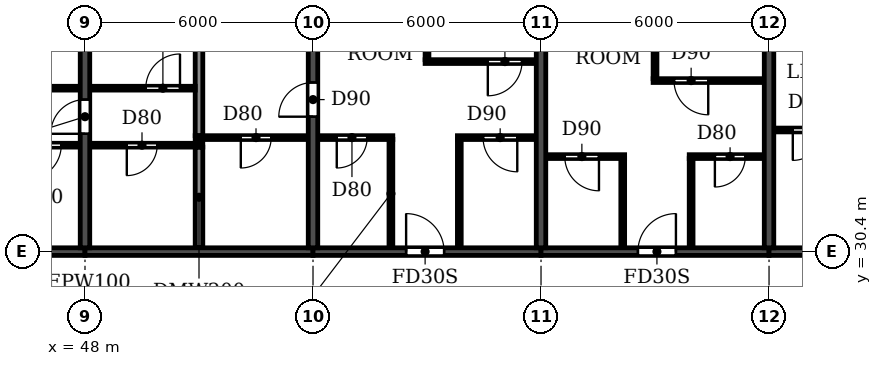
"""IFC4 building model, lengths in metres.
Left out: names, types, materials, properties, quantities, classifications, styles, units other than length and angle.
Written with IfcOpenShell. Run it as: python <this file> out.ifc"""

import sys

from ifc_helpers import new_model, si_unit, direction, frame, frame_2d, origin, place, context, subcontext, project, spatial, rectangle, extrude, element, fill, save


model = new_model("IFC4")
c1 = context("Model", 3, precision=1e-05, world=origin(), true_north=direction((0.0, 1.0)))
c2 = subcontext(c1, "Body", "Model", "MODEL_VIEW")
j1 = project(units=[si_unit("LENGTHUNIT", "METRE"), si_unit("PLANEANGLEUNIT", "RADIAN")], contexts=[c1])
p1 = place(None, origin())
s1 = spatial("IfcSite", under=j1, at=p1, CompositionType="ELEMENT")
p2 = place(p1, origin())
s2 = spatial("IfcBuilding", under=s1, at=p2, CompositionType="ELEMENT")
p3 = place(p2, frame((0.0, 0.0, 181.8)))
s3 = spatial("IfcBuildingStorey", under=s2, at=p3, CompositionType="ELEMENT", Elevation=181.8)
p4 = place(p3, frame((48.0, 30.5, 0.0), z_axis=(0.0, 0.0, 1.0), x_axis=(0.0, 1.0, 0.0)))
e1 = element("IfcWall", 1, at=p4, inside=s3, PredefinedType="SHEAR", context=c2, shape_type="SweptSolid", body=[
    extrude(rectangle(XDim=10.5, YDim=0.25, at=frame_2d((5.25, 0.0))), origin(), (0.0, 0.0, 1.0), 3.08),
])
p5 = place(p4, frame((3.0, 0.0, 0.0)))
e2 = element("IfcOpeningElement", 2, at=p5, cuts=e1, PredefinedType="OPENING", context=c2, shape_type="SweptSolid", body=[
    extrude(rectangle(XDim=0.9, YDim=2.1, at=frame_2d((0.45, 1.05))), frame((0.0, 0.135, 0.0), z_axis=(0.0, -1.0, 0.0), x_axis=(1.0, 0.0, 0.0)), (0.0, 0.0, 1.0), 0.27),
])
p6 = place(p3, frame((54.0, 30.5, 0.0), z_axis=(0.0, 0.0, 1.0), x_axis=(0.0, 1.0, 0.0)))
e3 = element("IfcWall", 3, at=p6, inside=s3, PredefinedType="SHEAR", context=c2, shape_type="SweptSolid", body=[
    extrude(rectangle(XDim=10.5, YDim=0.25, at=frame_2d((5.25, 0.0))), origin(), (0.0, 0.0, 1.0), 3.08),
])
p7 = place(p6, frame((3.45, 0.0, 0.0)))
e4 = element("IfcOpeningElement", 4, at=p7, cuts=e3, PredefinedType="OPENING", context=c2, shape_type="SweptSolid", body=[
    extrude(rectangle(XDim=0.9, YDim=2.1, at=frame_2d((0.45, 1.05))), frame((0.0, 0.135, 0.0), z_axis=(0.0, -1.0, 0.0), x_axis=(1.0, 0.0, 0.0)), (0.0, 0.0, 1.0), 0.27),
])
for number, where, z_axis, x_axis in (
    (5, (60.0, 30.5, 0.0), (0.0, 0.0, 1.0), (0.0, 1.0, 0.0)),
    (6, (66.0, 30.5, 0.0), (0.0, 0.0, 1.0), (0.0, 1.0, 0.0)),
):
    element("IfcWall", number, at=place(p3, frame(where, z_axis=z_axis, x_axis=x_axis)), inside=s3, PredefinedType="SHEAR", context=c2, shape_type="SweptSolid", body=[
        extrude(rectangle(XDim=10.5, YDim=0.25, at=frame_2d((5.25, 0.0))), origin(), (0.0, 0.0, 1.0), 3.08),
    ])
p8 = place(p3, frame((42.0, 30.4, 0.0), z_axis=(0.0, 0.0, 1.0), x_axis=(1.0, 0.0, 0.0)))
e7 = element("IfcWall", 7, at=p8, inside=s3, PredefinedType="SHEAR", context=c2, shape_type="SweptSolid", body=[
    extrude(rectangle(XDim=6.0, YDim=0.2, at=frame_2d((3.0, 0.0))), origin(), (0.0, 0.0, 1.0), 2.48),
])
p9 = place(p8, frame((2.45, 0.0, 0.0)))
e8 = element("IfcOpeningElement", 8, at=p9, cuts=e7, PredefinedType="OPENING", context=c2, shape_type="SweptSolid", body=[
    extrude(rectangle(XDim=1.0, YDim=2.1, at=frame_2d((0.5, 1.05))), frame((0.0, 0.11, 0.0), z_axis=(0.0, -1.0, 0.0), x_axis=(1.0, 0.0, 0.0)), (0.0, 0.0, 1.0), 0.22),
])
p10 = place(p3, frame((48.0, 30.4, 0.0), z_axis=(0.0, 0.0, 1.0), x_axis=(1.0, 0.0, 0.0)))
e9 = element("IfcWall", 9, at=p10, inside=s3, PredefinedType="SHEAR", context=c2, shape_type="SweptSolid", body=[
    extrude(rectangle(XDim=6.0, YDim=0.2, at=frame_2d((3.0, 0.0))), origin(), (0.0, 0.0, 1.0), 2.48),
])
p11 = place(p3, frame((54.0, 30.4, 0.0), z_axis=(0.0, 0.0, 1.0), x_axis=(1.0, 0.0, 0.0)))
e10 = element("IfcWall", 10, at=p11, inside=s3, PredefinedType="SHEAR", context=c2, shape_type="SweptSolid", body=[
    extrude(rectangle(XDim=6.0, YDim=0.2, at=frame_2d((3.0, 0.0))), origin(), (0.0, 0.0, 1.0), 2.48),
])
p12 = place(p11, frame((2.45, 0.0, 0.0)))
e11 = element("IfcOpeningElement", 11, at=p12, cuts=e10, PredefinedType="OPENING", context=c2, shape_type="SweptSolid", body=[
    extrude(rectangle(XDim=1.0, YDim=2.1, at=frame_2d((0.5, 1.05))), frame((0.0, 0.11, 0.0), z_axis=(0.0, -1.0, 0.0), x_axis=(1.0, 0.0, 0.0)), (0.0, 0.0, 1.0), 0.22),
])
p13 = place(p3, frame((60.0, 30.4, 0.0), z_axis=(0.0, 0.0, 1.0), x_axis=(1.0, 0.0, 0.0)))
e12 = element("IfcWall", 12, at=p13, inside=s3, PredefinedType="SHEAR", context=c2, shape_type="SweptSolid", body=[
    extrude(rectangle(XDim=6.0, YDim=0.2, at=frame_2d((3.0, 0.0))), origin(), (0.0, 0.0, 1.0), 2.48),
])
p14 = place(p13, frame((2.55, 0.0, 0.0)))
e13 = element("IfcOpeningElement", 13, at=p14, cuts=e12, PredefinedType="OPENING", context=c2, shape_type="SweptSolid", body=[
    extrude(rectangle(XDim=1.0, YDim=2.1, at=frame_2d((0.5, 1.05))), frame((0.0, 0.11, 0.0), z_axis=(0.0, -1.0, 0.0), x_axis=(1.0, 0.0, 0.0)), (0.0, 0.0, 1.0), 0.22),
])
p15 = place(p3, frame((66.0, 30.4, 0.0), z_axis=(0.0, 0.0, 1.0), x_axis=(1.0, 0.0, 0.0)))
e14 = element("IfcWall", 14, at=p15, inside=s3, PredefinedType="SHEAR", context=c2, shape_type="SweptSolid", body=[
    extrude(rectangle(XDim=6.0, YDim=0.2, at=frame_2d((3.0, 0.0))), origin(), (0.0, 0.0, 1.0), 2.48),
])
p16 = place(p15, frame((2.45, 0.0, 0.0)))
e15 = element("IfcOpeningElement", 15, at=p16, cuts=e14, PredefinedType="OPENING", context=c2, shape_type="SweptSolid", body=[
    extrude(rectangle(XDim=1.0, YDim=2.1, at=frame_2d((0.5, 1.05))), frame((0.0, 0.11, 0.0), z_axis=(0.0, -1.0, 0.0), x_axis=(1.0, 0.0, 0.0)), (0.0, 0.0, 1.0), 0.22),
])
p17 = place(p3, frame((51.0, 30.51, 0.0), z_axis=(0.0, 0.0, 1.0), x_axis=(0.0, 1.0, 0.0)))
e16 = element("IfcWall", 16, at=p17, inside=s3, PredefinedType="PARTITIONING", context=c2, shape_type="SweptSolid", body=[
    extrude(rectangle(XDim=2.64, YDim=0.2, at=frame_2d((1.32, 0.0))), origin(), (0.0, 0.0, 1.0), 3.08),
])
p18 = place(p3, frame((51.0, 33.45, 0.0), z_axis=(0.0, 0.0, 1.0), x_axis=(0.0, 1.0, 0.0)))
e17 = element("IfcWall", 17, at=p18, inside=s3, PredefinedType="PARTITIONING", context=c2, shape_type="SweptSolid", body=[
    extrude(rectangle(XDim=7.69, YDim=0.2, at=frame_2d((3.845, 0.0))), origin(), (0.0, 0.0, 1.0), 3.08),
])
p19 = place(p3, frame((60.135, 32.9, 0.0), z_axis=(0.0, 0.0, 1.0), x_axis=(1.0, 0.0, 0.0)))
e18 = element("IfcWall", 18, at=p19, inside=s3, PredefinedType="PARTITIONING", context=c2, shape_type="SweptSolid", body=[
    extrude(rectangle(XDim=2.065, YDim=0.1, at=frame_2d((1.032, 0.0))), origin(), (0.0, 0.0, 1.0), 3.08),
])
p20 = place(p19, frame((0.49, 0.0, 0.0)))
e19 = element("IfcOpeningElement", 19, at=p20, cuts=e18, PredefinedType="OPENING", context=c2, shape_type="SweptSolid", body=[
    extrude(rectangle(XDim=0.9, YDim=2.1, at=frame_2d((0.45, 1.05))), frame((0.0, 0.06, 0.0), z_axis=(0.0, -1.0, 0.0), x_axis=(1.0, 0.0, 0.0)), (0.0, 0.0, 1.0), 0.12),
])
p21 = place(p3, frame((63.9, 32.9, 0.0), z_axis=(0.0, 0.0, 1.0), x_axis=(1.0, 0.0, 0.0)))
e20 = element("IfcWall", 20, at=p21, inside=s3, PredefinedType="PARTITIONING", context=c2, shape_type="SweptSolid", body=[
    extrude(rectangle(XDim=1.965, YDim=0.1, at=frame_2d((0.982, 0.0))), origin(), (0.0, 0.0, 1.0), 3.08),
])
p22 = place(p21, frame((0.675, 0.0, 0.0)))
e21 = element("IfcOpeningElement", 21, at=p22, cuts=e20, PredefinedType="OPENING", context=c2, shape_type="SweptSolid", body=[
    extrude(rectangle(XDim=0.8, YDim=2.1, at=frame_2d((0.4, 1.05))), frame((0.0, 0.06, 0.0), z_axis=(0.0, -1.0, 0.0), x_axis=(1.0, 0.0, 0.0)), (0.0, 0.0, 1.0), 0.12),
])
p23 = place(p3, frame((45.8, 33.2, 0.0), z_axis=(0.0, 0.0, 1.0), x_axis=(1.0, 0.0, 0.0)))
e22 = element("IfcWall", 22, at=p23, inside=s3, PredefinedType="PARTITIONING", context=c2, shape_type="SweptSolid", body=[
    extrude(rectangle(XDim=2.065, YDim=0.1, at=frame_2d((1.032, 0.0))), origin(), (0.0, 0.0, 1.0), 3.08),
])
p24 = place(p23, frame((0.675, 0.0, 0.0)))
e23 = element("IfcOpeningElement", 23, at=p24, cuts=e22, PredefinedType="OPENING", context=c2, shape_type="SweptSolid", body=[
    extrude(rectangle(XDim=0.9, YDim=2.1, at=frame_2d((0.45, 1.05))), frame((0.0, 0.06, 0.0), z_axis=(0.0, -1.0, 0.0), x_axis=(1.0, 0.0, 0.0)), (0.0, 0.0, 1.0), 0.12),
])
p25 = place(p3, frame((48.135, 33.2, 0.0), z_axis=(0.0, 0.0, 1.0), x_axis=(1.0, 0.0, 0.0)))
e24 = element("IfcWall", 24, at=p25, inside=s3, PredefinedType="PARTITIONING", context=c2, shape_type="SweptSolid", body=[
    extrude(rectangle(XDim=2.965, YDim=0.1, at=frame_2d((1.482, 0.0))), origin(), (0.0, 0.0, 1.0), 3.08),
])
p26 = place(p25, frame((0.965, 0.0, 0.0)))
e25 = element("IfcOpeningElement", 25, at=p26, cuts=e24, PredefinedType="OPENING", context=c2, shape_type="SweptSolid", body=[
    extrude(rectangle(XDim=0.8, YDim=2.1, at=frame_2d((0.4, 1.05))), frame((0.0, 0.06, 0.0), z_axis=(0.0, -1.0, 0.0), x_axis=(1.0, 0.0, 0.0)), (0.0, 0.0, 1.0), 0.12),
])
p27 = place(p3, frame((50.9, 33.4, 0.0), z_axis=(0.0, 0.0, 1.0), x_axis=(1.0, 0.0, 0.0)))
e26 = element("IfcWall", 26, at=p27, inside=s3, PredefinedType="PARTITIONING", context=c2, shape_type="SweptSolid", body=[
    extrude(rectangle(XDim=2.965, YDim=0.1, at=frame_2d((1.482, 0.0))), origin(), (0.0, 0.0, 1.0), 3.08),
])
p28 = place(p27, frame((1.2, 0.0, 0.0)))
e27 = element("IfcOpeningElement", 27, at=p28, cuts=e26, PredefinedType="OPENING", context=c2, shape_type="SweptSolid", body=[
    extrude(rectangle(XDim=0.8, YDim=2.1, at=frame_2d((0.4, 1.05))), frame((0.0, 0.06, 0.0), z_axis=(0.0, -1.0, 0.0), x_axis=(1.0, 0.0, 0.0)), (0.0, 0.0, 1.0), 0.12),
])
p29 = place(p3, frame((54.135, 33.4, 0.0), z_axis=(0.0, 0.0, 1.0), x_axis=(1.0, 0.0, 0.0)))
e28 = element("IfcWall", 28, at=p29, inside=s3, PredefinedType="PARTITIONING", context=c2, shape_type="SweptSolid", body=[
    extrude(rectangle(XDim=1.965, YDim=0.1, at=frame_2d((0.982, 0.0))), origin(), (0.0, 0.0, 1.0), 3.08),
])
p30 = place(p29, frame((0.49, 0.0, 0.0)))
e29 = element("IfcOpeningElement", 29, at=p30, cuts=e28, PredefinedType="OPENING", context=c2, shape_type="SweptSolid", body=[
    extrude(rectangle(XDim=0.8, YDim=2.1, at=frame_2d((0.4, 1.05))), frame((0.0, 0.06, 0.0), z_axis=(0.0, -1.0, 0.0), x_axis=(1.0, 0.0, 0.0)), (0.0, 0.0, 1.0), 0.12),
])
p31 = place(p3, frame((57.8, 33.4, 0.0), z_axis=(0.0, 0.0, 1.0), x_axis=(1.0, 0.0, 0.0)))
e30 = element("IfcWall", 30, at=p31, inside=s3, PredefinedType="PARTITIONING", context=c2, shape_type="SweptSolid", body=[
    extrude(rectangle(XDim=2.065, YDim=0.1, at=frame_2d((1.032, 0.0))), origin(), (0.0, 0.0, 1.0), 3.08),
])
p32 = place(p31, frame((0.675, 0.0, 0.0)))
e31 = element("IfcOpeningElement", 31, at=p32, cuts=e30, PredefinedType="OPENING", context=c2, shape_type="SweptSolid", body=[
    extrude(rectangle(XDim=0.9, YDim=2.1, at=frame_2d((0.45, 1.05))), frame((0.0, 0.06, 0.0), z_axis=(0.0, -1.0, 0.0), x_axis=(1.0, 0.0, 0.0)), (0.0, 0.0, 1.0), 0.12),
])
p33 = place(p3, frame((66.135, 33.6, 0.0), z_axis=(0.0, 0.0, 1.0), x_axis=(1.0, 0.0, 0.0)))
e32 = element("IfcWall", 32, at=p33, inside=s3, PredefinedType="PARTITIONING", context=c2, shape_type="SweptSolid", body=[
    extrude(rectangle(XDim=1.965, YDim=0.1, at=frame_2d((0.982, 0.0))), origin(), (0.0, 0.0, 1.0), 3.08),
])
p34 = place(p33, frame((0.49, 0.0, 0.0)))
e33 = element("IfcOpeningElement", 33, at=p34, cuts=e32, PredefinedType="OPENING", context=c2, shape_type="SweptSolid", body=[
    extrude(rectangle(XDim=0.8, YDim=2.1, at=frame_2d((0.4, 1.05))), frame((0.0, 0.06, 0.0), z_axis=(0.0, -1.0, 0.0), x_axis=(1.0, 0.0, 0.0)), (0.0, 0.0, 1.0), 0.12),
])
p35 = place(p3, frame((44.95, 34.7, 0.0), z_axis=(0.0, 0.0, 1.0), x_axis=(1.0, 0.0, 0.0)))
e34 = element("IfcWall", 34, at=p35, inside=s3, PredefinedType="PARTITIONING", context=c2, shape_type="SweptSolid", body=[
    extrude(rectangle(XDim=2.915, YDim=0.1, at=frame_2d((1.458, 0.0))), origin(), (0.0, 0.0, 1.0), 3.08),
])
p36 = place(p35, frame((0.55, 0.0, 0.0)))
e35 = element("IfcOpeningElement", 35, at=p36, cuts=e34, PredefinedType="OPENING", context=c2, shape_type="SweptSolid", body=[
    extrude(rectangle(XDim=0.9, YDim=2.1, at=frame_2d((0.45, 1.05))), frame((0.0, 0.06, 0.0), z_axis=(0.0, -1.0, 0.0), x_axis=(1.0, 0.0, 0.0)), (0.0, 0.0, 1.0), 0.12),
])
p37 = place(p3, frame((48.135, 34.7, 0.0), z_axis=(0.0, 0.0, 1.0), x_axis=(1.0, 0.0, 0.0)))
e36 = element("IfcWall", 36, at=p37, inside=s3, PredefinedType="PARTITIONING", context=c2, shape_type="SweptSolid", body=[
    extrude(rectangle(XDim=2.765, YDim=0.1, at=frame_2d((1.382, 0.0))), origin(), (0.0, 0.0, 1.0), 3.08),
])
p38 = place(p37, frame((1.465, 0.0, 0.0)))
e37 = element("IfcOpeningElement", 37, at=p38, cuts=e36, PredefinedType="OPENING", context=c2, shape_type="SweptSolid", body=[
    extrude(rectangle(XDim=0.9, YDim=2.1, at=frame_2d((0.45, 1.05))), frame((0.0, 0.06, 0.0), z_axis=(0.0, -1.0, 0.0), x_axis=(1.0, 0.0, 0.0)), (0.0, 0.0, 1.0), 0.12),
])
p39 = place(p3, frame((62.95, 34.9, 0.0), z_axis=(0.0, 0.0, 1.0), x_axis=(1.0, 0.0, 0.0)))
e38 = element("IfcWall", 38, at=p39, inside=s3, PredefinedType="PARTITIONING", context=c2, shape_type="SweptSolid", body=[
    extrude(rectangle(XDim=2.915, YDim=0.1, at=frame_2d((1.458, 0.0))), origin(), (0.0, 0.0, 1.0), 3.08),
])
p40 = place(p39, frame((0.55, 0.0, 0.0)))
e39 = element("IfcOpeningElement", 39, at=p40, cuts=e38, PredefinedType="OPENING", context=c2, shape_type="SweptSolid", body=[
    extrude(rectangle(XDim=0.9, YDim=2.1, at=frame_2d((0.45, 1.05))), frame((0.0, 0.06, 0.0), z_axis=(0.0, -1.0, 0.0), x_axis=(1.0, 0.0, 0.0)), (0.0, 0.0, 1.0), 0.12),
])
p41 = place(p3, frame((56.95, 35.4, 0.0), z_axis=(0.0, 0.0, 1.0), x_axis=(1.0, 0.0, 0.0)))
e40 = element("IfcWall", 40, at=p41, inside=s3, PredefinedType="PARTITIONING", context=c2, shape_type="SweptSolid", body=[
    extrude(rectangle(XDim=2.915, YDim=0.1, at=frame_2d((1.458, 0.0))), origin(), (0.0, 0.0, 1.0), 3.08),
])
p42 = place(p41, frame((1.65, 0.0, 0.0)))
e41 = element("IfcOpeningElement", 41, at=p42, cuts=e40, PredefinedType="OPENING", context=c2, shape_type="SweptSolid", body=[
    extrude(rectangle(XDim=0.9, YDim=2.1, at=frame_2d((0.45, 1.05))), frame((0.0, 0.06, 0.0), z_axis=(0.0, -1.0, 0.0), x_axis=(1.0, 0.0, 0.0)), (0.0, 0.0, 1.0), 0.12),
])
p43 = place(p3, frame((56.05, 30.51, 0.0), z_axis=(0.0, 0.0, 1.0), x_axis=(0.0, 1.0, 0.0)))
e42 = element("IfcWall", 42, at=p43, inside=s3, PredefinedType="PARTITIONING", context=c2, shape_type="SweptSolid", body=[
    extrude(rectangle(XDim=2.84, YDim=0.1, at=frame_2d((1.42, 0.0))), origin(), (0.0, 0.0, 1.0), 3.08),
])
p44 = place(p3, frame((57.0, 35.45, 0.0), z_axis=(0.0, 0.0, 1.0), x_axis=(0.0, 1.0, 0.0)))
e43 = element("IfcWall", 43, at=p44, inside=s3, PredefinedType="PARTITIONING", context=c2, shape_type="SweptSolid", body=[
    extrude(rectangle(XDim=5.69, YDim=0.1, at=frame_2d((2.845, 0.0))), origin(), (0.0, 0.0, 1.0), 3.08),
])
p45 = place(p3, frame((57.85, 30.51, 0.0), z_axis=(0.0, 0.0, 1.0), x_axis=(0.0, 1.0, 0.0)))
e44 = element("IfcWall", 44, at=p45, inside=s3, PredefinedType="PARTITIONING", context=c2, shape_type="SweptSolid", body=[
    extrude(rectangle(XDim=2.84, YDim=0.1, at=frame_2d((1.42, 0.0))), origin(), (0.0, 0.0, 1.0), 3.08),
])
p46 = place(p3, frame((62.15, 30.51, 0.0), z_axis=(0.0, 0.0, 1.0), x_axis=(0.0, 1.0, 0.0)))
e45 = element("IfcWall", 45, at=p46, inside=s3, PredefinedType="PARTITIONING", context=c2, shape_type="SweptSolid", body=[
    extrude(rectangle(XDim=2.34, YDim=0.1, at=frame_2d((1.17, 0.0))), origin(), (0.0, 0.0, 1.0), 3.08),
])
p47 = place(p3, frame((63.0, 34.95, 0.0), z_axis=(0.0, 0.0, 1.0), x_axis=(0.0, 1.0, 0.0)))
e46 = element("IfcWall", 46, at=p47, inside=s3, PredefinedType="PARTITIONING", context=c2, shape_type="SweptSolid", body=[
    extrude(rectangle(XDim=6.19, YDim=0.1, at=frame_2d((3.095, 0.0))), origin(), (0.0, 0.0, 1.0), 3.08),
])
p48 = place(p3, frame((63.95, 30.51, 0.0), z_axis=(0.0, 0.0, 1.0), x_axis=(0.0, 1.0, 0.0)))
e47 = element("IfcWall", 47, at=p48, inside=s3, PredefinedType="PARTITIONING", context=c2, shape_type="SweptSolid", body=[
    extrude(rectangle(XDim=2.34, YDim=0.1, at=frame_2d((1.17, 0.0))), origin(), (0.0, 0.0, 1.0), 3.08),
])
p49 = place(p26, frame((0.8, 0.0, 0.0), z_axis=(0.0, 0.0, 1.0), x_axis=(-1.0, 0.0, 0.0)))
e48 = element("IfcDoor", 48, at=p49, inside=s3, OperationType="SINGLE_SWING_RIGHT", PredefinedType="DOOR", context=c2, shape_type="SweptSolid", body=[
    extrude(rectangle(XDim=0.8, YDim=2.1, at=frame_2d((0.4, 1.05))), frame((0.0, 0.025, 0.0), z_axis=(0.0, -1.0, 0.0), x_axis=(1.0, 0.0, 0.0)), (0.0, 0.0, 1.0), 0.05),
])
fill(e25, e48)
p50 = place(p38, origin())
e49 = element("IfcDoor", 49, at=p50, inside=s3, OperationType="SINGLE_SWING_RIGHT", PredefinedType="DOOR", context=c2, shape_type="SweptSolid", body=[
    extrude(rectangle(XDim=0.9, YDim=2.1, at=frame_2d((0.45, 1.05))), frame((0.0, 0.025, 0.0), z_axis=(0.0, -1.0, 0.0), x_axis=(1.0, 0.0, 0.0)), (0.0, 0.0, 1.0), 0.05),
])
fill(e37, e49)
p51 = place(p24, frame((0.9, 0.0, 0.0), z_axis=(0.0, 0.0, 1.0), x_axis=(-1.0, 0.0, 0.0)))
e50 = element("IfcDoor", 50, at=p51, inside=s3, OperationType="SINGLE_SWING_RIGHT", PredefinedType="DOOR", context=c2, shape_type="SweptSolid", body=[
    extrude(rectangle(XDim=0.9, YDim=2.1, at=frame_2d((0.45, 1.05))), frame((0.0, 0.025, 0.0), z_axis=(0.0, -1.0, 0.0), x_axis=(1.0, 0.0, 0.0)), (0.0, 0.0, 1.0), 0.05),
])
fill(e23, e50)
p52 = place(p5, origin())
e51 = element("IfcDoor", 51, at=p52, inside=s3, OperationType="SINGLE_SWING_LEFT", PredefinedType="DOOR", context=c2, shape_type="SweptSolid", body=[
    extrude(rectangle(XDim=0.9, YDim=2.1, at=frame_2d((0.45, 1.05))), frame((0.0, 0.025, 0.0), z_axis=(0.0, -1.0, 0.0), x_axis=(1.0, 0.0, 0.0)), (0.0, 0.0, 1.0), 0.05),
])
fill(e2, e51)
p53 = place(p28, frame((0.8, 0.0, 0.0), z_axis=(0.0, 0.0, 1.0), x_axis=(-1.0, 0.0, 0.0)))
e52 = element("IfcDoor", 52, at=p53, inside=s3, OperationType="SINGLE_SWING_RIGHT", PredefinedType="DOOR", context=c2, shape_type="SweptSolid", body=[
    extrude(rectangle(XDim=0.8, YDim=2.1, at=frame_2d((0.4, 1.05))), frame((0.0, 0.025, 0.0), z_axis=(0.0, -1.0, 0.0), x_axis=(1.0, 0.0, 0.0)), (0.0, 0.0, 1.0), 0.05),
])
fill(e27, e52)
p54 = place(p7, origin())
e53 = element("IfcDoor", 53, at=p54, inside=s3, OperationType="SINGLE_SWING_LEFT", PredefinedType="DOOR", context=c2, shape_type="SweptSolid", body=[
    extrude(rectangle(XDim=0.9, YDim=2.1, at=frame_2d((0.45, 1.05))), frame((0.0, 0.025, 0.0), z_axis=(0.0, -1.0, 0.0), x_axis=(1.0, 0.0, 0.0)), (0.0, 0.0, 1.0), 0.05),
])
fill(e4, e53)
p55 = place(p30, frame((0.8, 0.0, 0.0), z_axis=(0.0, 0.0, 1.0), x_axis=(-1.0, 0.0, 0.0)))
e54 = element("IfcDoor", 54, at=p55, inside=s3, OperationType="SINGLE_SWING_RIGHT", PredefinedType="DOOR", context=c2, shape_type="SweptSolid", body=[
    extrude(rectangle(XDim=0.8, YDim=2.1, at=frame_2d((0.4, 1.05))), frame((0.0, 0.025, 0.0), z_axis=(0.0, -1.0, 0.0), x_axis=(1.0, 0.0, 0.0)), (0.0, 0.0, 1.0), 0.05),
])
fill(e29, e54)
p56 = place(p12, origin())
e55 = element("IfcDoor", 55, at=p56, inside=s3, OperationType="SINGLE_SWING_LEFT", PredefinedType="DOOR", context=c2, shape_type="SweptSolid", body=[
    extrude(rectangle(XDim=1.0, YDim=2.1, at=frame_2d((0.5, 1.05))), frame((0.0, 0.025, 0.0), z_axis=(0.0, -1.0, 0.0), x_axis=(1.0, 0.0, 0.0)), (0.0, 0.0, 1.0), 0.05),
])
fill(e11, e55)
p57 = place(p32, frame((0.9, 0.0, 0.0), z_axis=(0.0, 0.0, 1.0), x_axis=(-1.0, 0.0, 0.0)))
e56 = element("IfcDoor", 56, at=p57, inside=s3, OperationType="SINGLE_SWING_LEFT", PredefinedType="DOOR", context=c2, shape_type="SweptSolid", body=[
    extrude(rectangle(XDim=0.9, YDim=2.1, at=frame_2d((0.45, 1.05))), frame((0.0, 0.025, 0.0), z_axis=(0.0, -1.0, 0.0), x_axis=(1.0, 0.0, 0.0)), (0.0, 0.0, 1.0), 0.05),
])
fill(e31, e56)
p58 = place(p42, frame((0.9, 0.0, 0.0), z_axis=(0.0, 0.0, 1.0), x_axis=(-1.0, 0.0, 0.0)))
e57 = element("IfcDoor", 57, at=p58, inside=s3, OperationType="SINGLE_SWING_RIGHT", PredefinedType="DOOR", context=c2, shape_type="SweptSolid", body=[
    extrude(rectangle(XDim=0.9, YDim=2.1, at=frame_2d((0.45, 1.05))), frame((0.0, 0.025, 0.0), z_axis=(0.0, -1.0, 0.0), x_axis=(1.0, 0.0, 0.0)), (0.0, 0.0, 1.0), 0.05),
])
fill(e41, e57)
p59 = place(p20, frame((0.9, 0.0, 0.0), z_axis=(0.0, 0.0, 1.0), x_axis=(-1.0, 0.0, 0.0)))
e58 = element("IfcDoor", 58, at=p59, inside=s3, OperationType="SINGLE_SWING_LEFT", PredefinedType="DOOR", context=c2, shape_type="SweptSolid", body=[
    extrude(rectangle(XDim=0.9, YDim=2.1, at=frame_2d((0.45, 1.05))), frame((0.0, 0.025, 0.0), z_axis=(0.0, -1.0, 0.0), x_axis=(1.0, 0.0, 0.0)), (0.0, 0.0, 1.0), 0.05),
])
fill(e19, e58)
p60 = place(p14, origin())
e59 = element("IfcDoor", 59, at=p60, inside=s3, OperationType="SINGLE_SWING_RIGHT", PredefinedType="DOOR", context=c2, shape_type="SweptSolid", body=[
    extrude(rectangle(XDim=1.0, YDim=2.1, at=frame_2d((0.5, 1.05))), frame((0.0, 0.025, 0.0), z_axis=(0.0, -1.0, 0.0), x_axis=(1.0, 0.0, 0.0)), (0.0, 0.0, 1.0), 0.05),
])
fill(e13, e59)
p61 = place(p40, frame((0.9, 0.0, 0.0), z_axis=(0.0, 0.0, 1.0), x_axis=(-1.0, 0.0, 0.0)))
e60 = element("IfcDoor", 60, at=p61, inside=s3, OperationType="SINGLE_SWING_LEFT", PredefinedType="DOOR", context=c2, shape_type="SweptSolid", body=[
    extrude(rectangle(XDim=0.9, YDim=2.1, at=frame_2d((0.45, 1.05))), frame((0.0, 0.025, 0.0), z_axis=(0.0, -1.0, 0.0), x_axis=(1.0, 0.0, 0.0)), (0.0, 0.0, 1.0), 0.05),
])
fill(e39, e60)
p62 = place(p22, frame((0.8, 0.0, 0.0), z_axis=(0.0, 0.0, 1.0), x_axis=(-1.0, 0.0, 0.0)))
e61 = element("IfcDoor", 61, at=p62, inside=s3, OperationType="SINGLE_SWING_RIGHT", PredefinedType="DOOR", context=c2, shape_type="SweptSolid", body=[
    extrude(rectangle(XDim=0.8, YDim=2.1, at=frame_2d((0.4, 1.05))), frame((0.0, 0.025, 0.0), z_axis=(0.0, -1.0, 0.0), x_axis=(1.0, 0.0, 0.0)), (0.0, 0.0, 1.0), 0.05),
])
fill(e21, e61)
p63 = place(p34, frame((0.8, 0.0, 0.0), z_axis=(0.0, 0.0, 1.0), x_axis=(-1.0, 0.0, 0.0)))
e62 = element("IfcDoor", 62, at=p63, inside=s3, OperationType="SINGLE_SWING_RIGHT", PredefinedType="DOOR", context=c2, shape_type="SweptSolid", body=[
    extrude(rectangle(XDim=0.8, YDim=2.1, at=frame_2d((0.4, 1.05))), frame((0.0, 0.025, 0.0), z_axis=(0.0, -1.0, 0.0), x_axis=(1.0, 0.0, 0.0)), (0.0, 0.0, 1.0), 0.05),
])
fill(e33, e62)
save(model, sys.argv[1])
